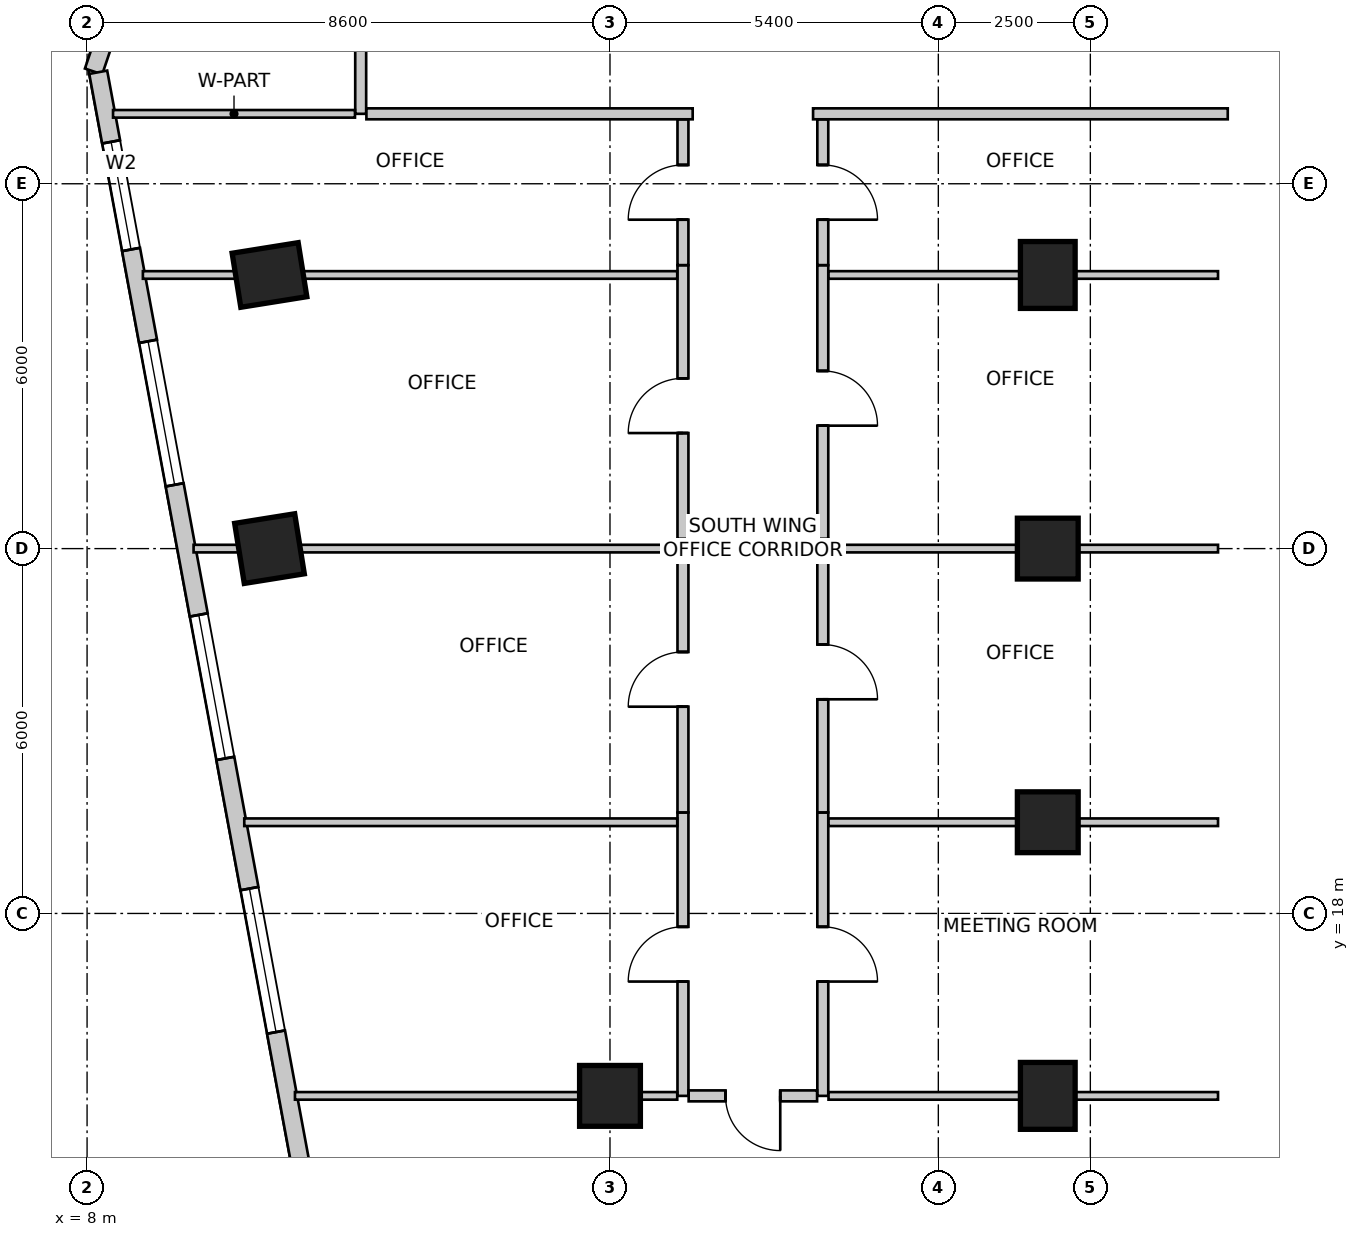
"""IFC4 building model, lengths in metres.
Left out: names, types, materials, properties, quantities, classifications, styles, units other than length and angle.
Written with IfcOpenShell. Run it as: python <this file> out.ifc"""

import sys

from ifc_helpers import new_model, si_unit, direction, frame, frame_2d, origin, origin_2d, place, context, subcontext, project, spatial, rectangle, extrude, source, transform, mapped, element, fill, save


model = new_model("IFC4")
c1 = context("Model", 3, precision=1e-05, world=origin(), true_north=direction((0.0, 1.0)))
c2 = subcontext(c1, "Body", "Model", "MODEL_VIEW")
j1 = project(units=[si_unit("LENGTHUNIT", "METRE"), si_unit("PLANEANGLEUNIT", "RADIAN")], contexts=[c1])
p1 = place(None, origin())
s1 = spatial("IfcSite", under=j1, at=p1, CompositionType="ELEMENT")
p2 = place(p1, origin())
s2 = spatial("IfcBuilding", under=s1, at=p2, CompositionType="ELEMENT")
p3 = place(p2, frame((0.0, 0.0, 59.0)))
s3 = spatial("IfcBuildingStorey", under=s2, at=p3, CompositionType="ELEMENT", Elevation=59.0)
m1 = source(origin(), c2, "Body", "SweptSolid", [
    extrude(rectangle(XDim=0.9, YDim=1.1, at=origin_2d()), origin(), (0.0, 0.0, 1.0), 4.0),
])
p4 = place(p3, frame((11.0, 28.5, 0.0), z_axis=(0.0, 0.0, 1.0), x_axis=(0.158158067254, -0.987413806751, 0.0)))
e1 = element("IfcColumn", 1, at=p4, inside=s3, PredefinedType="COLUMN", context=c2, shape_type="MappedRepresentation", body=[
    mapped(m1, transform((0.0, 0.0, 0.0), scale=1.0)),
])
m2 = source(origin(), c2, "Body", "SweptSolid", [
    extrude(rectangle(XDim=1.0, YDim=1.0, at=origin_2d()), origin(), (0.0, 0.0, 1.0), 4.0),
])
p5 = place(p3, frame((11.0, 24.0, 0.0), z_axis=(0.0, 0.0, 1.0), x_axis=(0.158158067254, -0.987413806751, 0.0)))
e2 = element("IfcColumn", 2, at=p5, inside=s3, PredefinedType="COLUMN", context=c2, shape_type="MappedRepresentation", body=[
    mapped(m2, transform((0.0, 0.0, 0.0), scale=1.0)),
])
p6 = place(p3, frame((23.8, 28.5, 0.0), z_axis=(0.0, 0.0, 1.0), x_axis=(1.0, 0.0, 0.0)))
e3 = element("IfcColumn", 3, at=p6, inside=s3, PredefinedType="COLUMN", context=c2, shape_type="MappedRepresentation", body=[
    mapped(m1, transform((0.0, 0.0, 0.0), scale=1.0)),
])
for number, where, z_axis, x_axis in (
    (4, (23.8, 24.0, 0.0), (0.0, 0.0, 1.0), (1.0, 0.0, 0.0)),
    (5, (23.8, 19.5, 0.0), (0.0, 0.0, 1.0), (1.0, 0.0, 0.0)),
):
    element("IfcColumn", number, at=place(p3, frame(where, z_axis=z_axis, x_axis=x_axis)), inside=s3, PredefinedType="COLUMN", context=c2, shape_type="MappedRepresentation", body=[
        mapped(m2, transform((0.0, 0.0, 0.0), scale=1.0)),
    ])
p7 = place(p3, frame((23.8, 15.0, 0.0), z_axis=(0.0, 0.0, 1.0), x_axis=(1.0, 0.0, 0.0)))
e6 = element("IfcColumn", 6, at=p7, inside=s3, PredefinedType="COLUMN", context=c2, shape_type="MappedRepresentation", body=[
    mapped(m1, transform((0.0, 0.0, 0.0), scale=1.0)),
])
p8 = place(p3, frame((16.6, 15.0, 0.0), z_axis=(0.0, 0.0, 1.0), x_axis=(1.0, 0.0, 0.0)))
e7 = element("IfcColumn", 7, at=p8, inside=s3, PredefinedType="COLUMN", context=c2, shape_type="MappedRepresentation", body=[
    mapped(m2, transform((0.0, 0.0, 0.0), scale=1.0)),
])
p9 = place(p3, frame((13.269, 47.134, 0.0), z_axis=(0.0, 0.0, 1.0), x_axis=(-0.319920423265, -0.947444416722, 0.0)))
e8 = element("IfcWall", 8, at=p9, inside=s3, PredefinedType="SOLIDWALL", context=c2, shape_type="SweptSolid", body=[
    extrude(rectangle(XDim=16.135, YDim=0.3, at=frame_2d((8.067, 0.0))), origin(), (0.0, 0.0, 1.0), 3.7),
])
m3 = source(origin(), c2, "Body", "SweptSolid", [
    extrude(rectangle(XDim=2.8, YDim=2.4, at=frame_2d((1.4, 1.2))), frame((0.0, 0.16, 0.0), z_axis=(0.0, -1.0, 0.0), x_axis=(1.0, 0.0, 0.0)), (0.0, 0.0, 1.0), 0.32),
])
p10 = place(p9, frame((1.988, 0.0, 0.85)))
e9 = element("IfcOpeningElement", 9, at=p10, cuts=e8, PredefinedType="OPENING", context=c2, shape_type="MappedRepresentation", body=[
    mapped(m3, transform((0.0, 0.0, 0.0), scale=1.0)),
])
m4 = source(origin(), c2, "Body", "SweptSolid", [
    extrude(rectangle(XDim=2.4, YDim=2.2, at=frame_2d((1.2, 1.1))), frame((0.0, 0.16, 0.0), z_axis=(0.0, -1.0, 0.0), x_axis=(1.0, 0.0, 0.0)), (0.0, 0.0, 1.0), 0.32),
])
p11 = place(p9, frame((7.159, 0.0, 0.85)))
e10 = element("IfcOpeningElement", 10, at=p11, cuts=e8, PredefinedType="OPENING", context=c2, shape_type="MappedRepresentation", body=[
    mapped(m4, transform((0.0, 0.0, 0.0), scale=1.0)),
])
p12 = place(p9, frame((11.93, 0.0, 0.85)))
e11 = element("IfcOpeningElement", 11, at=p12, cuts=e8, PredefinedType="OPENING", context=c2, shape_type="MappedRepresentation", body=[
    mapped(m3, transform((0.0, 0.0, 0.0), scale=1.0)),
])
p13 = place(p3, frame((8.183, 31.833, 0.0), z_axis=(0.0, 0.0, 1.0), x_axis=(0.18216364648, -0.983268226834, 0.0)))
e12 = element("IfcWall", 12, at=p13, inside=s3, PredefinedType="SOLIDWALL", context=c2, shape_type="SweptSolid", body=[
    extrude(rectangle(XDim=26.678, YDim=0.3, at=frame_2d((13.339, 0.0))), origin(), (0.0, 0.0, 1.0), 3.7),
])
m5 = source(origin(), c2, "Body", "SweptSolid", [
    extrude(rectangle(XDim=1.8, YDim=2.1, at=frame_2d((0.9, 1.05))), frame((0.0, 0.16, 0.0), z_axis=(0.0, -1.0, 0.0), x_axis=(1.0, 0.0, 0.0)), (0.0, 0.0, 1.0), 0.32),
])
p14 = place(p13, frame((1.164, 0.0, 0.85)))
e13 = element("IfcOpeningElement", 13, at=p14, cuts=e12, PredefinedType="OPENING", context=c2, shape_type="MappedRepresentation", body=[
    mapped(m5, transform((0.0, 0.0, 0.0), scale=1.0)),
])
p15 = place(p13, frame((4.5, 0.0, 0.85)))
e14 = element("IfcOpeningElement", 14, at=p15, cuts=e12, PredefinedType="OPENING", context=c2, shape_type="MappedRepresentation", body=[
    mapped(m4, transform((0.0, 0.0, 0.0), scale=1.0)),
])
p16 = place(p13, frame((9.076, 0.0, 0.85)))
e15 = element("IfcOpeningElement", 15, at=p16, cuts=e12, PredefinedType="OPENING", context=c2, shape_type="MappedRepresentation", body=[
    mapped(m4, transform((0.0, 0.0, 0.0), scale=1.0)),
])
p17 = place(p13, frame((13.653, 0.0, 0.85)))
e16 = element("IfcOpeningElement", 16, at=p17, cuts=e12, PredefinedType="OPENING", context=c2, shape_type="MappedRepresentation", body=[
    mapped(m4, transform((0.0, 0.0, 0.0), scale=1.0)),
])
p18 = place(p13, frame((18.411, 0.0, 0.85)))
e17 = element("IfcOpeningElement", 17, at=p18, cuts=e12, PredefinedType="OPENING", context=c2, shape_type="MappedRepresentation", body=[
    mapped(m4, transform((0.0, 0.0, 0.0), scale=1.0)),
])
p19 = place(p13, frame((22.709, 0.0, 0.85)))
e18 = element("IfcOpeningElement", 18, at=p19, cuts=e12, PredefinedType="OPENING", context=c2, shape_type="MappedRepresentation", body=[
    mapped(m3, transform((0.0, 0.0, 0.0), scale=1.0)),
])
p20 = place(p3, frame((12.5, 31.15, 0.0), z_axis=(0.0, 0.0, 1.0), x_axis=(0.0, 1.0, 0.0)))
e19 = element("IfcWall", 19, at=p20, inside=s3, PredefinedType="PARTITIONING", context=c2, shape_type="SweptSolid", body=[
    extrude(rectangle(XDim=2.2, YDim=0.18, at=frame_2d((1.1, 0.0))), origin(), (0.0, 0.0, 1.0), 3.384),
])
p21 = place(p3, frame((17.96, 31.15, 0.0), z_axis=(0.0, 0.0, 1.0), x_axis=(-1.0, 0.0, 0.0)))
e20 = element("IfcWall", 20, at=p21, inside=s3, PredefinedType="PARTITIONING", context=c2, shape_type="SweptSolid", body=[
    extrude(rectangle(XDim=5.366, YDim=0.18, at=frame_2d((2.683, 0.0))), origin(), (0.0, 0.0, 1.0), 3.384),
])
p22 = place(p3, frame((26.76, 31.15, 0.0), z_axis=(0.0, 0.0, 1.0), x_axis=(-1.0, 0.0, 0.0)))
e21 = element("IfcWall", 21, at=p22, inside=s3, PredefinedType="PARTITIONING", context=c2, shape_type="SweptSolid", body=[
    extrude(rectangle(XDim=6.82, YDim=0.18, at=frame_2d((3.41, 0.0))), origin(), (0.0, 0.0, 1.0), 3.384),
])
p23 = place(p3, frame((12.406, 31.15, 0.0), z_axis=(0.0, 0.0, 1.0), x_axis=(-1.0, 0.0, 0.0)))
e22 = element("IfcWall", 22, at=p23, inside=s3, PredefinedType="PARTITIONING", context=c2, shape_type="SweptSolid", body=[
    extrude(rectangle(XDim=3.979, YDim=0.125, at=frame_2d((1.99, 0.0))), origin(), (0.0, 0.0, 1.0), 2.842),
])
p24 = place(p3, frame((17.8, 15.0, 0.0), z_axis=(0.0, 0.0, 1.0), x_axis=(0.0, 1.0, 0.0)))
e23 = element("IfcWall", 23, at=p24, inside=s3, PredefinedType="PARTITIONING", context=c2, shape_type="SweptSolid", body=[
    extrude(rectangle(XDim=4.66, YDim=0.18, at=frame_2d((2.33, 0.0))), origin(), (0.0, 0.0, 1.0), 2.842),
])
m6 = source(origin(), c2, "Body", "SweptSolid", [
    extrude(rectangle(XDim=0.9, YDim=2.15, at=frame_2d((0.45, 1.075))), frame((0.0, 0.1, 0.0), z_axis=(0.0, -1.0, 0.0), x_axis=(1.0, 0.0, 0.0)), (0.0, 0.0, 1.0), 0.2),
])
p25 = place(p24, frame((1.88, 0.0, 0.0)))
e24 = element("IfcOpeningElement", 24, at=p25, cuts=e23, PredefinedType="OPENING", context=c2, shape_type="MappedRepresentation", body=[
    mapped(m6, transform((0.0, 0.0, 0.0), scale=1.0)),
])
p26 = place(p3, frame((20.1, 19.66, 0.0), z_axis=(0.0, 0.0, 1.0), x_axis=(0.0, -1.0, 0.0)))
e25 = element("IfcWall", 25, at=p26, inside=s3, PredefinedType="PARTITIONING", context=c2, shape_type="SweptSolid", body=[
    extrude(rectangle(XDim=4.66, YDim=0.18, at=frame_2d((2.33, 0.0))), origin(), (0.0, 0.0, 1.0), 2.842),
])
p27 = place(p26, frame((1.88, 0.0, 0.0)))
e26 = element("IfcOpeningElement", 26, at=p27, cuts=e25, PredefinedType="OPENING", context=c2, shape_type="MappedRepresentation", body=[
    mapped(m6, transform((0.0, 0.0, 0.0), scale=1.0)),
])
p28 = place(p3, frame((17.8, 19.662, 0.0), z_axis=(0.0, 0.0, 1.0), x_axis=(0.0, 1.0, 0.0)))
e27 = element("IfcWall", 27, at=p28, inside=s3, PredefinedType="PARTITIONING", context=c2, shape_type="SweptSolid", body=[
    extrude(rectangle(XDim=4.498, YDim=0.18, at=frame_2d((2.249, 0.0))), origin(), (0.0, 0.0, 1.0), 3.075),
])
p29 = place(p28, frame((1.738, 0.0, 0.0)))
e28 = element("IfcOpeningElement", 28, at=p29, cuts=e27, PredefinedType="OPENING", context=c2, shape_type="MappedRepresentation", body=[
    mapped(m6, transform((0.0, 0.0, 0.0), scale=1.0)),
])
p30 = place(p3, frame((20.1, 24.16, 0.0), z_axis=(0.0, 0.0, 1.0), x_axis=(0.0, -1.0, 0.0)))
e29 = element("IfcWall", 29, at=p30, inside=s3, PredefinedType="PARTITIONING", context=c2, shape_type="SweptSolid", body=[
    extrude(rectangle(XDim=4.498, YDim=0.18, at=frame_2d((2.249, 0.0))), origin(), (0.0, 0.0, 1.0), 3.075),
])
p31 = place(p30, frame((1.738, 0.0, 0.0)))
e30 = element("IfcOpeningElement", 30, at=p31, cuts=e29, PredefinedType="OPENING", context=c2, shape_type="MappedRepresentation", body=[
    mapped(m6, transform((0.0, 0.0, 0.0), scale=1.0)),
])
p32 = place(p3, frame((17.8, 24.162, 0.0), z_axis=(0.0, 0.0, 1.0), x_axis=(0.0, 1.0, 0.0)))
e31 = element("IfcWall", 31, at=p32, inside=s3, PredefinedType="PARTITIONING", context=c2, shape_type="SweptSolid", body=[
    extrude(rectangle(XDim=4.498, YDim=0.18, at=frame_2d((2.249, 0.0))), origin(), (0.0, 0.0, 1.0), 3.075),
])
p33 = place(p32, frame((1.738, 0.0, 0.0)))
e32 = element("IfcOpeningElement", 32, at=p33, cuts=e31, PredefinedType="OPENING", context=c2, shape_type="MappedRepresentation", body=[
    mapped(m6, transform((0.0, 0.0, 0.0), scale=1.0)),
])
p34 = place(p3, frame((20.1, 28.66, 0.0), z_axis=(0.0, 0.0, 1.0), x_axis=(0.0, -1.0, 0.0)))
e33 = element("IfcWall", 33, at=p34, inside=s3, PredefinedType="PARTITIONING", context=c2, shape_type="SweptSolid", body=[
    extrude(rectangle(XDim=4.498, YDim=0.18, at=frame_2d((2.249, 0.0))), origin(), (0.0, 0.0, 1.0), 3.075),
])
p35 = place(p34, frame((1.738, 0.0, 0.0)))
e34 = element("IfcOpeningElement", 34, at=p35, cuts=e33, PredefinedType="OPENING", context=c2, shape_type="MappedRepresentation", body=[
    mapped(m6, transform((0.0, 0.0, 0.0), scale=1.0)),
])
p36 = place(p3, frame((17.8, 28.662, 0.0), z_axis=(0.0, 0.0, 1.0), x_axis=(0.0, 1.0, 0.0)))
e35 = element("IfcWall", 35, at=p36, inside=s3, PredefinedType="PARTITIONING", context=c2, shape_type="SweptSolid", body=[
    extrude(rectangle(XDim=2.394, YDim=0.18, at=frame_2d((1.197, 0.0))), origin(), (0.0, 0.0, 1.0), 3.384),
])
p37 = place(p36, frame((0.747, 0.0, 0.0)))
e36 = element("IfcOpeningElement", 36, at=p37, cuts=e35, PredefinedType="OPENING", context=c2, shape_type="MappedRepresentation", body=[
    mapped(m6, transform((0.0, 0.0, 0.0), scale=1.0)),
])
p38 = place(p3, frame((20.1, 31.056, 0.0), z_axis=(0.0, 0.0, 1.0), x_axis=(0.0, -1.0, 0.0)))
e37 = element("IfcWall", 37, at=p38, inside=s3, PredefinedType="PARTITIONING", context=c2, shape_type="SweptSolid", body=[
    extrude(rectangle(XDim=2.394, YDim=0.18, at=frame_2d((1.197, 0.0))), origin(), (0.0, 0.0, 1.0), 3.384),
])
p39 = place(p38, frame((0.747, 0.0, 0.0)))
e38 = element("IfcOpeningElement", 38, at=p39, cuts=e37, PredefinedType="OPENING", context=c2, shape_type="MappedRepresentation", body=[
    mapped(m6, transform((0.0, 0.0, 0.0), scale=1.0)),
])
p40 = place(p3, frame((20.006, 15.0, 0.0), z_axis=(0.0, 0.0, 1.0), x_axis=(-1.0, 0.0, 0.0)))
e39 = element("IfcWall", 39, at=p40, inside=s3, PredefinedType="PARTITIONING", context=c2, shape_type="SweptSolid", body=[
    extrude(rectangle(XDim=2.112, YDim=0.18, at=frame_2d((1.056, 0.0))), origin(), (0.0, 0.0, 1.0), 2.842),
])
p41 = place(p40, frame((0.606, 0.0, 0.0)))
e40 = element("IfcOpeningElement", 40, at=p41, cuts=e39, PredefinedType="OPENING", context=c2, shape_type="MappedRepresentation", body=[
    mapped(m6, transform((0.0, 0.0, 0.0), scale=1.0)),
])
p42 = place(p3, frame((10.585, 19.5, 0.0), z_axis=(0.0, 0.0, 1.0), x_axis=(1.0, 0.0, 0.0)))
e41 = element("IfcWall", 41, at=p42, inside=s3, PredefinedType="PARTITIONING", context=c2, shape_type="SweptSolid", body=[
    extrude(rectangle(XDim=7.121, YDim=0.125, at=frame_2d((3.561, 0.0))), origin(), (0.0, 0.0, 1.0), 3.7),
])
p43 = place(p3, frame((17.706, 15.0, 0.0), z_axis=(0.0, 0.0, 1.0), x_axis=(-1.0, 0.0, 0.0)))
e42 = element("IfcWall", 42, at=p43, inside=s3, PredefinedType="PARTITIONING", context=c2, shape_type="SweptSolid", body=[
    extrude(rectangle(XDim=6.287, YDim=0.125, at=frame_2d((3.144, 0.0))), origin(), (0.0, 0.0, 1.0), 2.842),
])
for number, where, z_axis, x_axis in (
    (43, (20.194, 19.5, 0.0), (0.0, 0.0, 1.0), (1.0, 0.0, 0.0)),
    (44, (26.6, 15.0, 0.0), (0.0, 0.0, 1.0), (-1.0, 0.0, 0.0)),
):
    element("IfcWall", number, at=place(p3, frame(where, z_axis=z_axis, x_axis=x_axis)), inside=s3, PredefinedType="PARTITIONING", context=c2, shape_type="SweptSolid", body=[
        extrude(rectangle(XDim=6.406, YDim=0.125, at=frame_2d((3.203, 0.0))), origin(), (0.0, 0.0, 1.0), 2.842),
    ])
p44 = place(p3, frame((9.752, 24.0, 0.0), z_axis=(0.0, 0.0, 1.0), x_axis=(1.0, 0.0, 0.0)))
e45 = element("IfcWall", 45, at=p44, inside=s3, PredefinedType="PARTITIONING", context=c2, shape_type="SweptSolid", body=[
    extrude(rectangle(XDim=7.954, YDim=0.125, at=frame_2d((3.977, 0.0))), origin(), (0.0, 0.0, 1.0), 2.842),
])
p45 = place(p3, frame((20.194, 24.0, 0.0), z_axis=(0.0, 0.0, 1.0), x_axis=(1.0, 0.0, 0.0)))
e46 = element("IfcWall", 46, at=p45, inside=s3, PredefinedType="PARTITIONING", context=c2, shape_type="SweptSolid", body=[
    extrude(rectangle(XDim=6.406, YDim=0.125, at=frame_2d((3.203, 0.0))), origin(), (0.0, 0.0, 1.0), 2.842),
])
p46 = place(p3, frame((8.918, 28.5, 0.0), z_axis=(0.0, 0.0, 1.0), x_axis=(1.0, 0.0, 0.0)))
e47 = element("IfcWall", 47, at=p46, inside=s3, PredefinedType="PARTITIONING", context=c2, shape_type="SweptSolid", body=[
    extrude(rectangle(XDim=8.788, YDim=0.125, at=frame_2d((4.394, 0.0))), origin(), (0.0, 0.0, 1.0), 2.842),
])
p47 = place(p3, frame((20.194, 28.5, 0.0), z_axis=(0.0, 0.0, 1.0), x_axis=(1.0, 0.0, 0.0)))
e48 = element("IfcWall", 48, at=p47, inside=s3, PredefinedType="PARTITIONING", context=c2, shape_type="SweptSolid", body=[
    extrude(rectangle(XDim=6.406, YDim=0.125, at=frame_2d((3.203, 0.0))), origin(), (0.0, 0.0, 1.0), 2.842),
])
m7 = source(origin(), c2, "Body", "SweptSolid", [
    extrude(rectangle(XDim=1.8, YDim=2.1, at=frame_2d((0.9, 1.05))), frame((0.0, -0.015, 0.0), z_axis=(0.0, -1.0, 0.0), x_axis=(1.0, 0.0, 0.0)), (0.0, 0.0, 1.0), 0.06),
])
p48 = place(p14, origin())
e49 = element("IfcWindow", 49, at=p48, inside=s3, PartitioningType="SINGLE_PANEL", PredefinedType="WINDOW", context=c2, shape_type="MappedRepresentation", body=[
    mapped(m7, transform((0.0, 0.0, 0.0), scale=1.0)),
])
fill(e13, e49)
m8 = source(origin(), c2, "Body", "SweptSolid", [
    extrude(rectangle(XDim=2.4, YDim=2.2, at=frame_2d((1.2, 1.1))), frame((0.0, -0.015, 0.0), z_axis=(0.0, -1.0, 0.0), x_axis=(1.0, 0.0, 0.0)), (0.0, 0.0, 1.0), 0.06),
])
p49 = place(p15, origin())
e50 = element("IfcWindow", 50, at=p49, inside=s3, PartitioningType="SINGLE_PANEL", PredefinedType="WINDOW", context=c2, shape_type="MappedRepresentation", body=[
    mapped(m8, transform((0.0, 0.0, 0.0), scale=1.0)),
])
fill(e14, e50)
p50 = place(p16, origin())
e51 = element("IfcWindow", 51, at=p50, inside=s3, PartitioningType="SINGLE_PANEL", PredefinedType="WINDOW", context=c2, shape_type="MappedRepresentation", body=[
    mapped(m8, transform((0.0, 0.0, 0.0), scale=1.0)),
])
fill(e15, e51)
p51 = place(p17, origin())
e52 = element("IfcWindow", 52, at=p51, inside=s3, PartitioningType="SINGLE_PANEL", PredefinedType="WINDOW", context=c2, shape_type="MappedRepresentation", body=[
    mapped(m8, transform((0.0, 0.0, 0.0), scale=1.0)),
])
fill(e16, e52)
m9 = source(origin(), c2, "Body", "SweptSolid", [
    extrude(rectangle(XDim=0.9, YDim=2.15, at=frame_2d((0.45, 1.075))), frame((0.0, 0.025, 0.0), z_axis=(0.0, -1.0, 0.0), x_axis=(1.0, 0.0, 0.0)), (0.0, 0.0, 1.0), 0.05),
])
p52 = place(p25, origin())
e53 = element("IfcDoor", 53, at=p52, inside=s3, OperationType="SINGLE_SWING_LEFT", PredefinedType="DOOR", context=c2, shape_type="MappedRepresentation", body=[
    mapped(m9, transform((0.0, 0.0, 0.0), scale=1.0)),
])
fill(e24, e53)
p53 = place(p27, origin())
e54 = element("IfcDoor", 54, at=p53, inside=s3, OperationType="SINGLE_SWING_RIGHT", PredefinedType="DOOR", context=c2, shape_type="MappedRepresentation", body=[
    mapped(m9, transform((0.0, 0.0, 0.0), scale=1.0)),
])
fill(e26, e54)
p54 = place(p29, origin())
e55 = element("IfcDoor", 55, at=p54, inside=s3, OperationType="SINGLE_SWING_LEFT", PredefinedType="DOOR", context=c2, shape_type="MappedRepresentation", body=[
    mapped(m9, transform((0.0, 0.0, 0.0), scale=1.0)),
])
fill(e28, e55)
p55 = place(p31, origin())
e56 = element("IfcDoor", 56, at=p55, inside=s3, OperationType="SINGLE_SWING_RIGHT", PredefinedType="DOOR", context=c2, shape_type="MappedRepresentation", body=[
    mapped(m9, transform((0.0, 0.0, 0.0), scale=1.0)),
])
fill(e30, e56)
p56 = place(p33, origin())
e57 = element("IfcDoor", 57, at=p56, inside=s3, OperationType="SINGLE_SWING_LEFT", PredefinedType="DOOR", context=c2, shape_type="MappedRepresentation", body=[
    mapped(m9, transform((0.0, 0.0, 0.0), scale=1.0)),
])
fill(e32, e57)
p57 = place(p35, origin())
e58 = element("IfcDoor", 58, at=p57, inside=s3, OperationType="SINGLE_SWING_RIGHT", PredefinedType="DOOR", context=c2, shape_type="MappedRepresentation", body=[
    mapped(m9, transform((0.0, 0.0, 0.0), scale=1.0)),
])
fill(e34, e58)
p58 = place(p37, origin())
e59 = element("IfcDoor", 59, at=p58, inside=s3, OperationType="SINGLE_SWING_LEFT", PredefinedType="DOOR", context=c2, shape_type="MappedRepresentation", body=[
    mapped(m9, transform((0.0, 0.0, 0.0), scale=1.0)),
])
fill(e36, e59)
p59 = place(p39, origin())
e60 = element("IfcDoor", 60, at=p59, inside=s3, OperationType="SINGLE_SWING_RIGHT", PredefinedType="DOOR", context=c2, shape_type="MappedRepresentation", body=[
    mapped(m9, transform((0.0, 0.0, 0.0), scale=1.0)),
])
fill(e38, e60)
p60 = place(p41, origin())
e61 = element("IfcDoor", 61, at=p60, inside=s3, OperationType="SINGLE_SWING_LEFT", PredefinedType="DOOR", context=c2, shape_type="MappedRepresentation", body=[
    mapped(m9, transform((0.0, 0.0, 0.0), scale=1.0)),
])
fill(e40, e61)
save(model, sys.argv[1])
